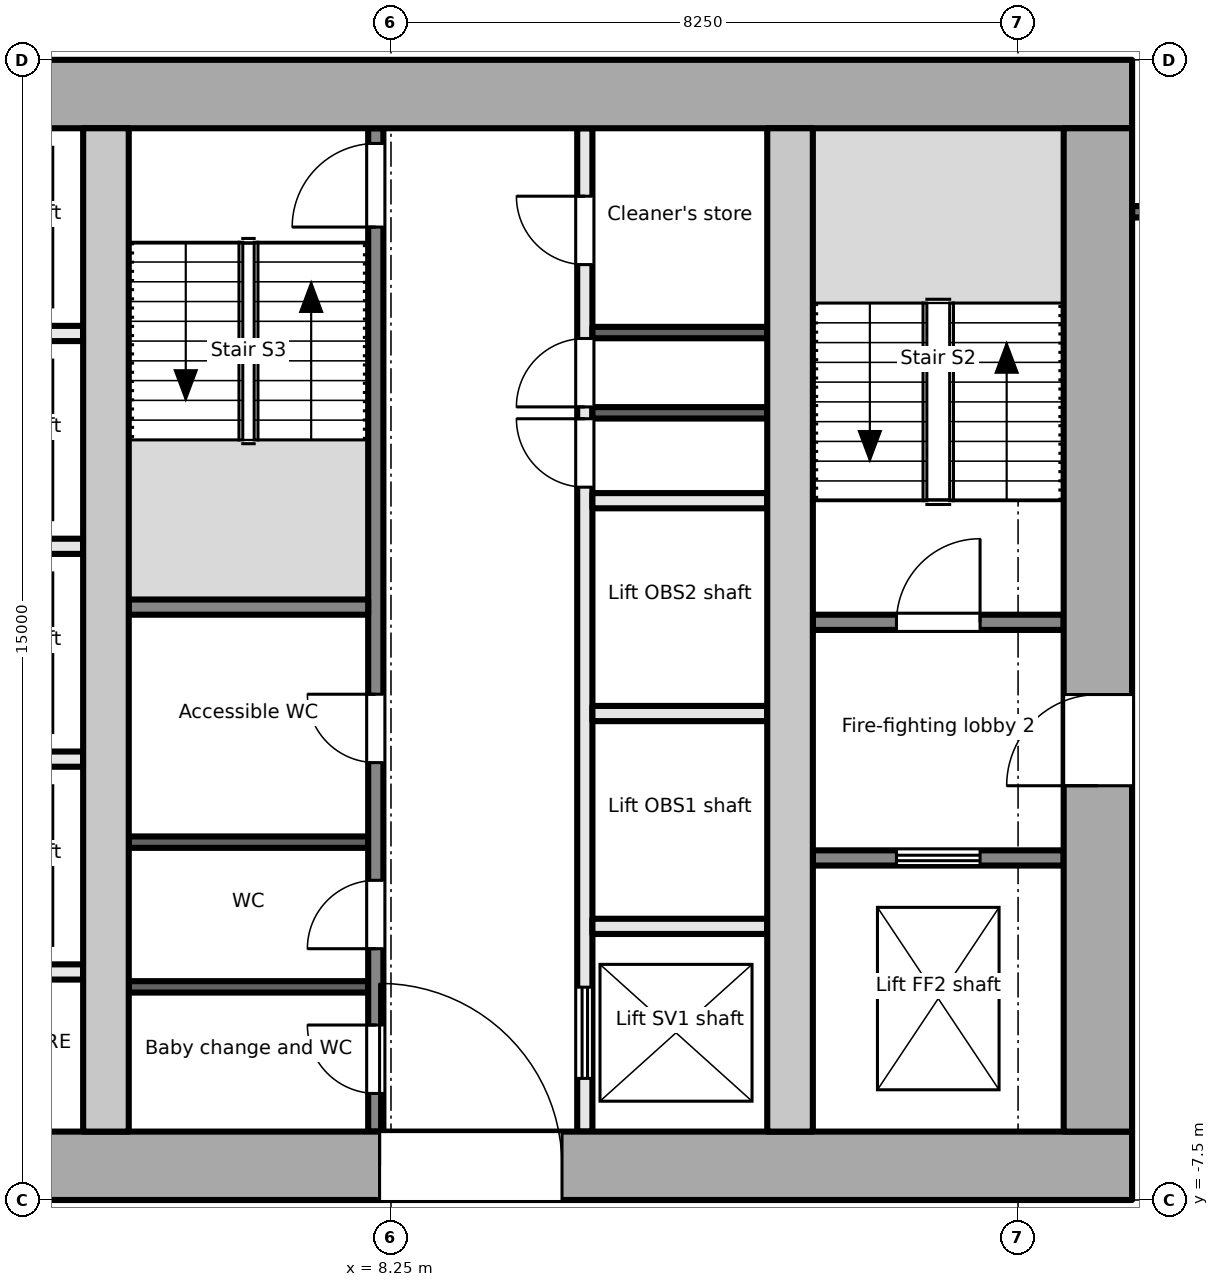
"""IFC4 building model, lengths in metres.
Left out: names, types, materials, properties, quantities, classifications, styles, units other than length and angle.
Written with IfcOpenShell. Run it as: python <this file> out.ifc"""

import sys

from ifc_helpers import new_model, si_unit, direction, frame, frame_2d, origin, place, context, subcontext, project, spatial, rectangle, extrude, element, fill, save


model = new_model("IFC4")
c1 = context("Model", 3, precision=1e-05, world=origin(), true_north=direction((0.0, 1.0)))
c2 = subcontext(c1, "Body", "Model", "MODEL_VIEW")
j1 = project(units=[si_unit("LENGTHUNIT", "METRE"), si_unit("PLANEANGLEUNIT", "RADIAN")], contexts=[c1])
p1 = place(None, origin())
s1 = spatial("IfcSite", under=j1, at=p1, CompositionType="ELEMENT")
p2 = place(p1, origin())
s2 = spatial("IfcBuilding", under=s1, at=p2, CompositionType="ELEMENT")
p3 = place(p2, frame((0.0, 0.0, 255.1)))
s3 = spatial("IfcBuildingStorey", under=s2, at=p3, CompositionType="ELEMENT", Elevation=255.1)
p4 = place(p3, frame((-18.0, -7.05, -0.2), z_axis=(0.0, 0.0, 1.0), x_axis=(1.0, 0.0, 0.0)))
e1 = element("IfcWall", 1, at=p4, inside=s3, PredefinedType="SHEAR", context=c2, shape_type="SweptSolid", body=[
    extrude(rectangle(XDim=36.0, YDim=0.9, at=frame_2d((18.0, 0.0))), origin(), (0.0, 0.0, 1.0), 3.9),
])
p5 = place(p4, frame((8.1, 0.0, 0.2)))
e2 = element("IfcOpeningElement", 2, at=p5, cuts=e1, PredefinedType="OPENING", context=c2, shape_type="SweptSolid", body=[
    extrude(rectangle(XDim=1.8, YDim=2.1, at=frame_2d((0.9, 1.05))), frame((0.0, 0.46, 0.0), z_axis=(0.0, -1.0, 0.0), x_axis=(1.0, 0.0, 0.0)), (0.0, 0.0, 1.0), 0.921),
])
p6 = place(p4, frame((16.8, 0.0, 0.2)))
e3 = element("IfcOpeningElement", 3, at=p6, cuts=e1, PredefinedType="OPENING", context=c2, shape_type="SweptSolid", body=[
    extrude(rectangle(XDim=2.4, YDim=2.1, at=frame_2d((1.2, 1.05))), frame((0.0, 0.46, 0.0), z_axis=(0.0, -1.0, 0.0), x_axis=(1.0, 0.0, 0.0)), (0.0, 0.0, 1.0), 0.921),
])
p7 = place(p4, frame((26.1, 0.0, 0.2)))
e4 = element("IfcOpeningElement", 4, at=p7, cuts=e1, PredefinedType="OPENING", context=c2, shape_type="SweptSolid", body=[
    extrude(rectangle(XDim=2.4, YDim=2.1, at=frame_2d((1.2, 1.05))), frame((0.0, 0.46, 0.0), z_axis=(0.0, -1.0, 0.0), x_axis=(1.0, 0.0, 0.0)), (0.0, 0.0, 1.0), 0.921),
])
p8 = place(p3, frame((-18.0, 7.05, -0.2), z_axis=(0.0, 0.0, 1.0), x_axis=(1.0, 0.0, 0.0)))
e5 = element("IfcWall", 5, at=p8, inside=s3, PredefinedType="SHEAR", context=c2, shape_type="SweptSolid", body=[
    extrude(rectangle(XDim=36.0, YDim=0.9, at=frame_2d((18.0, 0.0))), origin(), (0.0, 0.0, 1.0), 3.9),
])
p9 = place(p3, frame((17.55, -6.6, -0.2), z_axis=(0.0, 0.0, 1.0), x_axis=(0.0, 1.0, 0.0)))
e6 = element("IfcWall", 6, at=p9, inside=s3, PredefinedType="SHEAR", context=c2, shape_type="SweptSolid", body=[
    extrude(rectangle(XDim=13.2, YDim=0.9, at=frame_2d((6.6, 0.0))), origin(), (0.0, 0.0, 1.0), 3.9),
])
p10 = place(p9, frame((4.55, 0.0, 0.2)))
e7 = element("IfcOpeningElement", 7, at=p10, cuts=e6, PredefinedType="OPENING", context=c2, shape_type="SweptSolid", body=[
    extrude(rectangle(XDim=1.2, YDim=2.1, at=frame_2d((0.6, 1.05))), frame((0.0, 0.46, 0.0), z_axis=(0.0, -1.0, 0.0), x_axis=(1.0, 0.0, 0.0)), (0.0, 0.0, 1.0), 0.921),
])
for number, where, z_axis, x_axis in (
    (8, (4.5, -6.6, -0.2), (0.0, 0.0, 1.0), (0.0, 1.0, 0.0)),
    (9, (13.5, -6.6, -0.2), (0.0, 0.0, 1.0), (0.0, 1.0, 0.0)),
):
    element("IfcWall", number, at=place(p3, frame(where, z_axis=z_axis, x_axis=x_axis)), inside=s3, PredefinedType="SHEAR", context=c2, shape_type="SweptSolid", body=[
        extrude(rectangle(XDim=13.2, YDim=0.6, at=frame_2d((6.6, 0.0))), origin(), (0.0, 0.0, 1.0), 3.9),
    ])
p11 = place(p3, frame((13.8, -3.0, 0.0), z_axis=(0.0, 0.0, 1.0), x_axis=(1.0, 0.0, 0.0)))
e10 = element("IfcWall", 10, at=p11, inside=s3, PredefinedType="PARTITIONING", context=c2, shape_type="SweptSolid", body=[
    extrude(rectangle(XDim=3.3, YDim=0.2, at=frame_2d((1.65, 0.0))), origin(), (0.0, 0.0, 1.0), 3.7),
])
p12 = place(p11, frame((1.1, 0.0, 0.0)))
e11 = element("IfcOpeningElement", 11, at=p12, cuts=e10, PredefinedType="OPENING", context=c2, shape_type="SweptSolid", body=[
    extrude(rectangle(XDim=1.1, YDim=2.1, at=frame_2d((0.55, 1.05))), frame((0.0, 0.111, 0.0), z_axis=(0.0, -1.0, 0.0), x_axis=(1.0, 0.0, 0.0)), (0.0, 0.0, 1.0), 0.221),
])
p13 = place(p3, frame((13.8, 0.1, 0.0), z_axis=(0.0, 0.0, 1.0), x_axis=(1.0, 0.0, 0.0)))
e12 = element("IfcWall", 12, at=p13, inside=s3, PredefinedType="PARTITIONING", context=c2, shape_type="SweptSolid", body=[
    extrude(rectangle(XDim=3.3, YDim=0.2, at=frame_2d((1.65, 0.0))), origin(), (0.0, 0.0, 1.0), 3.7),
])
p14 = place(p13, frame((1.1, 0.0, 0.0)))
e13 = element("IfcOpeningElement", 13, at=p14, cuts=e12, PredefinedType="OPENING", context=c2, shape_type="SweptSolid", body=[
    extrude(rectangle(XDim=1.1, YDim=2.1, at=frame_2d((0.55, 1.05))), frame((0.0, 0.111, 0.0), z_axis=(0.0, -1.0, 0.0), x_axis=(1.0, 0.0, 0.0)), (0.0, 0.0, 1.0), 0.221),
])
for number, where, z_axis, x_axis in (
    (14, (1.9, -1.7, 0.0), (0.0, 0.0, 1.0), (1.0, 0.0, 0.0)),
    (15, (1.9, 1.1, 0.0), (0.0, 0.0, 1.0), (1.0, 0.0, 0.0)),
    (16, (1.9, 3.9, 0.0), (0.0, 0.0, 1.0), (1.0, 0.0, 0.0)),
    (17, (1.9, -4.5, 0.0), (0.0, 0.0, 1.0), (1.0, 0.0, 0.0)),
):
    element("IfcWall", number, at=place(p3, frame(where, z_axis=z_axis, x_axis=x_axis)), inside=s3, PredefinedType="PARTITIONING", context=c2, shape_type="SweptSolid", body=[
        extrude(rectangle(XDim=2.3, YDim=0.2, at=frame_2d((1.15, 0.0))), origin(), (0.0, 0.0, 1.0), 3.7),
    ])
p15 = place(p3, frame((8.05, -6.6, 0.0), z_axis=(0.0, 0.0, 1.0), x_axis=(0.0, 1.0, 0.0)))
e18 = element("IfcWall", 18, at=p15, inside=s3, PredefinedType="PARTITIONING", context=c2, shape_type="SweptSolid", body=[
    extrude(rectangle(XDim=13.2, YDim=0.2, at=frame_2d((6.6, 0.0))), origin(), (0.0, 0.0, 1.0), 3.7),
])
p16 = place(p15, frame((0.502, 0.0, 0.0)))
e19 = element("IfcOpeningElement", 19, at=p16, cuts=e18, PredefinedType="OPENING", context=c2, shape_type="SweptSolid", body=[
    extrude(rectangle(XDim=0.9, YDim=2.1, at=frame_2d((0.45, 1.05))), frame((0.0, 0.111, 0.0), z_axis=(0.0, -1.0, 0.0), x_axis=(1.0, 0.0, 0.0)), (0.0, 0.0, 1.0), 0.221),
])
p17 = place(p15, frame((2.406, 0.0, 0.0)))
e20 = element("IfcOpeningElement", 20, at=p17, cuts=e18, PredefinedType="OPENING", context=c2, shape_type="SweptSolid", body=[
    extrude(rectangle(XDim=0.9, YDim=2.1, at=frame_2d((0.45, 1.05))), frame((0.0, 0.111, 0.0), z_axis=(0.0, -1.0, 0.0), x_axis=(1.0, 0.0, 0.0)), (0.0, 0.0, 1.0), 0.221),
])
p18 = place(p15, frame((4.854, 0.0, 0.0)))
e21 = element("IfcOpeningElement", 21, at=p18, cuts=e18, PredefinedType="OPENING", context=c2, shape_type="SweptSolid", body=[
    extrude(rectangle(XDim=0.9, YDim=2.1, at=frame_2d((0.45, 1.05))), frame((0.0, 0.111, 0.0), z_axis=(0.0, -1.0, 0.0), x_axis=(1.0, 0.0, 0.0)), (0.0, 0.0, 1.0), 0.221),
])
p19 = place(p15, frame((11.9, 0.0, 0.0)))
e22 = element("IfcOpeningElement", 22, at=p19, cuts=e18, PredefinedType="OPENING", context=c2, shape_type="SweptSolid", body=[
    extrude(rectangle(XDim=1.1, YDim=2.1, at=frame_2d((0.55, 1.05))), frame((0.0, 0.111, 0.0), z_axis=(0.0, -1.0, 0.0), x_axis=(1.0, 0.0, 0.0)), (0.0, 0.0, 1.0), 0.221),
])
p20 = place(p3, frame((10.8, -6.6, 0.0), z_axis=(0.0, 0.0, 1.0), x_axis=(0.0, 1.0, 0.0)))
e23 = element("IfcWall", 23, at=p20, inside=s3, PredefinedType="PARTITIONING", context=c2, shape_type="SweptSolid", body=[
    extrude(rectangle(XDim=13.2, YDim=0.2, at=frame_2d((6.6, 0.0))), origin(), (0.0, 0.0, 1.0), 3.7),
])
p21 = place(p20, frame((0.7, 0.0, 0.0)))
e24 = element("IfcOpeningElement", 24, at=p21, cuts=e23, PredefinedType="OPENING", context=c2, shape_type="SweptSolid", body=[
    extrude(rectangle(XDim=1.2, YDim=2.1, at=frame_2d((0.6, 1.05))), frame((0.0, 0.111, 0.0), z_axis=(0.0, -1.0, 0.0), x_axis=(1.0, 0.0, 0.0)), (0.0, 0.0, 1.0), 0.221),
])
p22 = place(p20, frame((8.478, 0.0, 0.0)))
e25 = element("IfcOpeningElement", 25, at=p22, cuts=e23, PredefinedType="OPENING", context=c2, shape_type="SweptSolid", body=[
    extrude(rectangle(XDim=0.9, YDim=2.1, at=frame_2d((0.45, 1.05))), frame((0.0, 0.111, 0.0), z_axis=(0.0, -1.0, 0.0), x_axis=(1.0, 0.0, 0.0)), (0.0, 0.0, 1.0), 0.221),
])
p23 = place(p20, frame((9.534, 0.0, 0.0)))
e26 = element("IfcOpeningElement", 26, at=p23, cuts=e23, PredefinedType="OPENING", context=c2, shape_type="SweptSolid", body=[
    extrude(rectangle(XDim=0.9, YDim=2.1, at=frame_2d((0.45, 1.05))), frame((0.0, 0.111, 0.0), z_axis=(0.0, -1.0, 0.0), x_axis=(1.0, 0.0, 0.0)), (0.0, 0.0, 1.0), 0.221),
])
p24 = place(p20, frame((11.406, 0.0, 0.0)))
e27 = element("IfcOpeningElement", 27, at=p24, cuts=e23, PredefinedType="OPENING", context=c2, shape_type="SweptSolid", body=[
    extrude(rectangle(XDim=0.9, YDim=2.1, at=frame_2d((0.45, 1.05))), frame((0.0, 0.111, 0.0), z_axis=(0.0, -1.0, 0.0), x_axis=(1.0, 0.0, 0.0)), (0.0, 0.0, 1.0), 0.221),
])
p25 = place(p3, frame((4.8, 0.3, 0.0), z_axis=(0.0, 0.0, 1.0), x_axis=(1.0, 0.0, 0.0)))
e28 = element("IfcWall", 28, at=p25, inside=s3, PredefinedType="PARTITIONING", context=c2, shape_type="SweptSolid", body=[
    extrude(rectangle(XDim=3.15, YDim=0.2, at=frame_2d((1.575, 0.0))), origin(), (0.0, 0.0, 1.0), 3.7),
])
for number, where, z_axis, x_axis in (
    (29, (4.8, -4.696, 0.0), (0.0, 0.0, 1.0), (1.0, 0.0, 0.0)),
    (30, (4.8, -2.792, 0.0), (0.0, 0.0, 1.0), (1.0, 0.0, 0.0)),
):
    element("IfcWall", number, at=place(p3, frame(where, z_axis=z_axis, x_axis=x_axis)), inside=s3, PredefinedType="PARTITIONING", context=c2, shape_type="SweptSolid", body=[
        extrude(rectangle(XDim=3.15, YDim=0.15, at=frame_2d((1.575, 0.0))), origin(), (0.0, 0.0, 1.0), 3.7),
    ])
for number, where, z_axis, x_axis in (
    (31, (10.9, -3.9, 0.0), (0.0, 0.0, 1.0), (1.0, 0.0, 0.0)),
    (32, (10.9, -1.1, 0.0), (0.0, 0.0, 1.0), (1.0, 0.0, 0.0)),
    (33, (10.9, 1.7, 0.0), (0.0, 0.0, 1.0), (1.0, 0.0, 0.0)),
):
    element("IfcWall", number, at=place(p3, frame(where, z_axis=z_axis, x_axis=x_axis)), inside=s3, PredefinedType="PARTITIONING", context=c2, shape_type="SweptSolid", body=[
        extrude(rectangle(XDim=2.3, YDim=0.2, at=frame_2d((1.15, 0.0))), origin(), (0.0, 0.0, 1.0), 3.7),
    ])
for number, where, z_axis, x_axis in (
    (34, (10.9, 2.856, 0.0), (0.0, 0.0, 1.0), (1.0, 0.0, 0.0)),
    (35, (10.9, 3.912, 0.0), (0.0, 0.0, 1.0), (1.0, 0.0, 0.0)),
):
    element("IfcWall", number, at=place(p3, frame(where, z_axis=z_axis, x_axis=x_axis)), inside=s3, PredefinedType="PARTITIONING", context=c2, shape_type="SweptSolid", body=[
        extrude(rectangle(XDim=2.3, YDim=0.15, at=frame_2d((1.15, 0.0))), origin(), (0.0, 0.0, 1.0), 3.7),
    ])
p26 = place(p3, frame((18.0, 5.501, 0.0), z_axis=(0.0, 0.0, 1.0), x_axis=(1.0, 0.0, 0.0)))
e36 = element("IfcWall", 36, at=p26, inside=s3, PredefinedType="PARTITIONING", context=c2, shape_type="SweptSolid", body=[
    extrude(rectangle(XDim=2.325, YDim=0.15, at=frame_2d((1.163, 0.0))), origin(), (0.0, 0.0, 1.0), 3.7),
])
p27 = place(p12, origin())
e37 = element("IfcDoor", 37, at=p27, inside=s3, OperationType="DOUBLE_DOOR_SLIDING", PredefinedType="DOOR", context=c2, shape_type="SweptSolid", body=[
    extrude(rectangle(XDim=1.1, YDim=2.1, at=frame_2d((0.55, 1.05))), frame((0.0, 0.025, 0.0), z_axis=(0.0, -1.0, 0.0), x_axis=(1.0, 0.0, 0.0)), (0.0, 0.0, 1.0), 0.05),
])
fill(e11, e37)
p28 = place(p10, origin())
e38 = element("IfcDoor", 38, at=p28, inside=s3, OperationType="SINGLE_SWING_LEFT", PredefinedType="DOOR", context=c2, shape_type="SweptSolid", body=[
    extrude(rectangle(XDim=1.2, YDim=2.1, at=frame_2d((0.6, 1.05))), frame((0.0, 0.025, 0.0), z_axis=(0.0, -1.0, 0.0), x_axis=(1.0, 0.0, 0.0)), (0.0, 0.0, 1.0), 0.05),
])
fill(e7, e38)
p29 = place(p14, origin())
e39 = element("IfcDoor", 39, at=p29, inside=s3, OperationType="SINGLE_SWING_RIGHT", PredefinedType="DOOR", context=c2, shape_type="SweptSolid", body=[
    extrude(rectangle(XDim=1.1, YDim=2.1, at=frame_2d((0.55, 1.05))), frame((0.0, 0.025, 0.0), z_axis=(0.0, -1.0, 0.0), x_axis=(1.0, 0.0, 0.0)), (0.0, 0.0, 1.0), 0.05),
])
fill(e13, e39)
p30 = place(p16, origin())
e40 = element("IfcDoor", 40, at=p30, inside=s3, OperationType="SINGLE_SWING_RIGHT", PredefinedType="DOOR", context=c2, shape_type="SweptSolid", body=[
    extrude(rectangle(XDim=0.9, YDim=2.1, at=frame_2d((0.45, 1.05))), frame((0.0, 0.025, 0.0), z_axis=(0.0, -1.0, 0.0), x_axis=(1.0, 0.0, 0.0)), (0.0, 0.0, 1.0), 0.05),
])
fill(e19, e40)
p31 = place(p17, origin())
e41 = element("IfcDoor", 41, at=p31, inside=s3, OperationType="SINGLE_SWING_LEFT", PredefinedType="DOOR", context=c2, shape_type="SweptSolid", body=[
    extrude(rectangle(XDim=0.9, YDim=2.1, at=frame_2d((0.45, 1.05))), frame((0.0, 0.025, 0.0), z_axis=(0.0, -1.0, 0.0), x_axis=(1.0, 0.0, 0.0)), (0.0, 0.0, 1.0), 0.05),
])
fill(e20, e41)
p32 = place(p18, origin())
e42 = element("IfcDoor", 42, at=p32, inside=s3, OperationType="SINGLE_SWING_RIGHT", PredefinedType="DOOR", context=c2, shape_type="SweptSolid", body=[
    extrude(rectangle(XDim=0.9, YDim=2.1, at=frame_2d((0.45, 1.05))), frame((0.0, 0.025, 0.0), z_axis=(0.0, -1.0, 0.0), x_axis=(1.0, 0.0, 0.0)), (0.0, 0.0, 1.0), 0.05),
])
fill(e21, e42)
p33 = place(p19, origin())
e43 = element("IfcDoor", 43, at=p33, inside=s3, OperationType="SINGLE_SWING_LEFT", PredefinedType="DOOR", context=c2, shape_type="SweptSolid", body=[
    extrude(rectangle(XDim=1.1, YDim=2.1, at=frame_2d((0.55, 1.05))), frame((0.0, 0.025, 0.0), z_axis=(0.0, -1.0, 0.0), x_axis=(1.0, 0.0, 0.0)), (0.0, 0.0, 1.0), 0.05),
])
fill(e22, e43)
p34 = place(p7, origin())
e44 = element("IfcDoor", 44, at=p34, inside=s3, OperationType="DOUBLE_DOOR_DOUBLE_SWING", PredefinedType="DOOR", context=c2, shape_type="SweptSolid", body=[
    extrude(rectangle(XDim=2.4, YDim=2.1, at=frame_2d((1.2, 1.05))), frame((0.0, 0.025, 0.0), z_axis=(0.0, -1.0, 0.0), x_axis=(1.0, 0.0, 0.0)), (0.0, 0.0, 1.0), 0.05),
])
fill(e4, e44)
p35 = place(p21, origin())
e45 = element("IfcDoor", 45, at=p35, inside=s3, OperationType="DOUBLE_DOOR_SLIDING", PredefinedType="DOOR", context=c2, shape_type="SweptSolid", body=[
    extrude(rectangle(XDim=1.2, YDim=2.1, at=frame_2d((0.6, 1.05))), frame((0.0, 0.025, 0.0), z_axis=(0.0, -1.0, 0.0), x_axis=(1.0, 0.0, 0.0)), (0.0, 0.0, 1.0), 0.05),
])
fill(e24, e45)
p36 = place(p22, origin())
e46 = element("IfcDoor", 46, at=p36, inside=s3, OperationType="SINGLE_SWING_RIGHT", PredefinedType="DOOR", context=c2, shape_type="SweptSolid", body=[
    extrude(rectangle(XDim=0.9, YDim=2.1, at=frame_2d((0.45, 1.05))), frame((0.0, 0.025, 0.0), z_axis=(0.0, -1.0, 0.0), x_axis=(1.0, 0.0, 0.0)), (0.0, 0.0, 1.0), 0.05),
])
fill(e25, e46)
p37 = place(p23, origin())
e47 = element("IfcDoor", 47, at=p37, inside=s3, OperationType="SINGLE_SWING_LEFT", PredefinedType="DOOR", context=c2, shape_type="SweptSolid", body=[
    extrude(rectangle(XDim=0.9, YDim=2.1, at=frame_2d((0.45, 1.05))), frame((0.0, 0.025, 0.0), z_axis=(0.0, -1.0, 0.0), x_axis=(1.0, 0.0, 0.0)), (0.0, 0.0, 1.0), 0.05),
])
fill(e26, e47)
p38 = place(p24, origin())
e48 = element("IfcDoor", 48, at=p38, inside=s3, OperationType="SINGLE_SWING_RIGHT", PredefinedType="DOOR", context=c2, shape_type="SweptSolid", body=[
    extrude(rectangle(XDim=0.9, YDim=2.1, at=frame_2d((0.45, 1.05))), frame((0.0, 0.025, 0.0), z_axis=(0.0, -1.0, 0.0), x_axis=(1.0, 0.0, 0.0)), (0.0, 0.0, 1.0), 0.05),
])
fill(e27, e48)
save(model, sys.argv[1])
